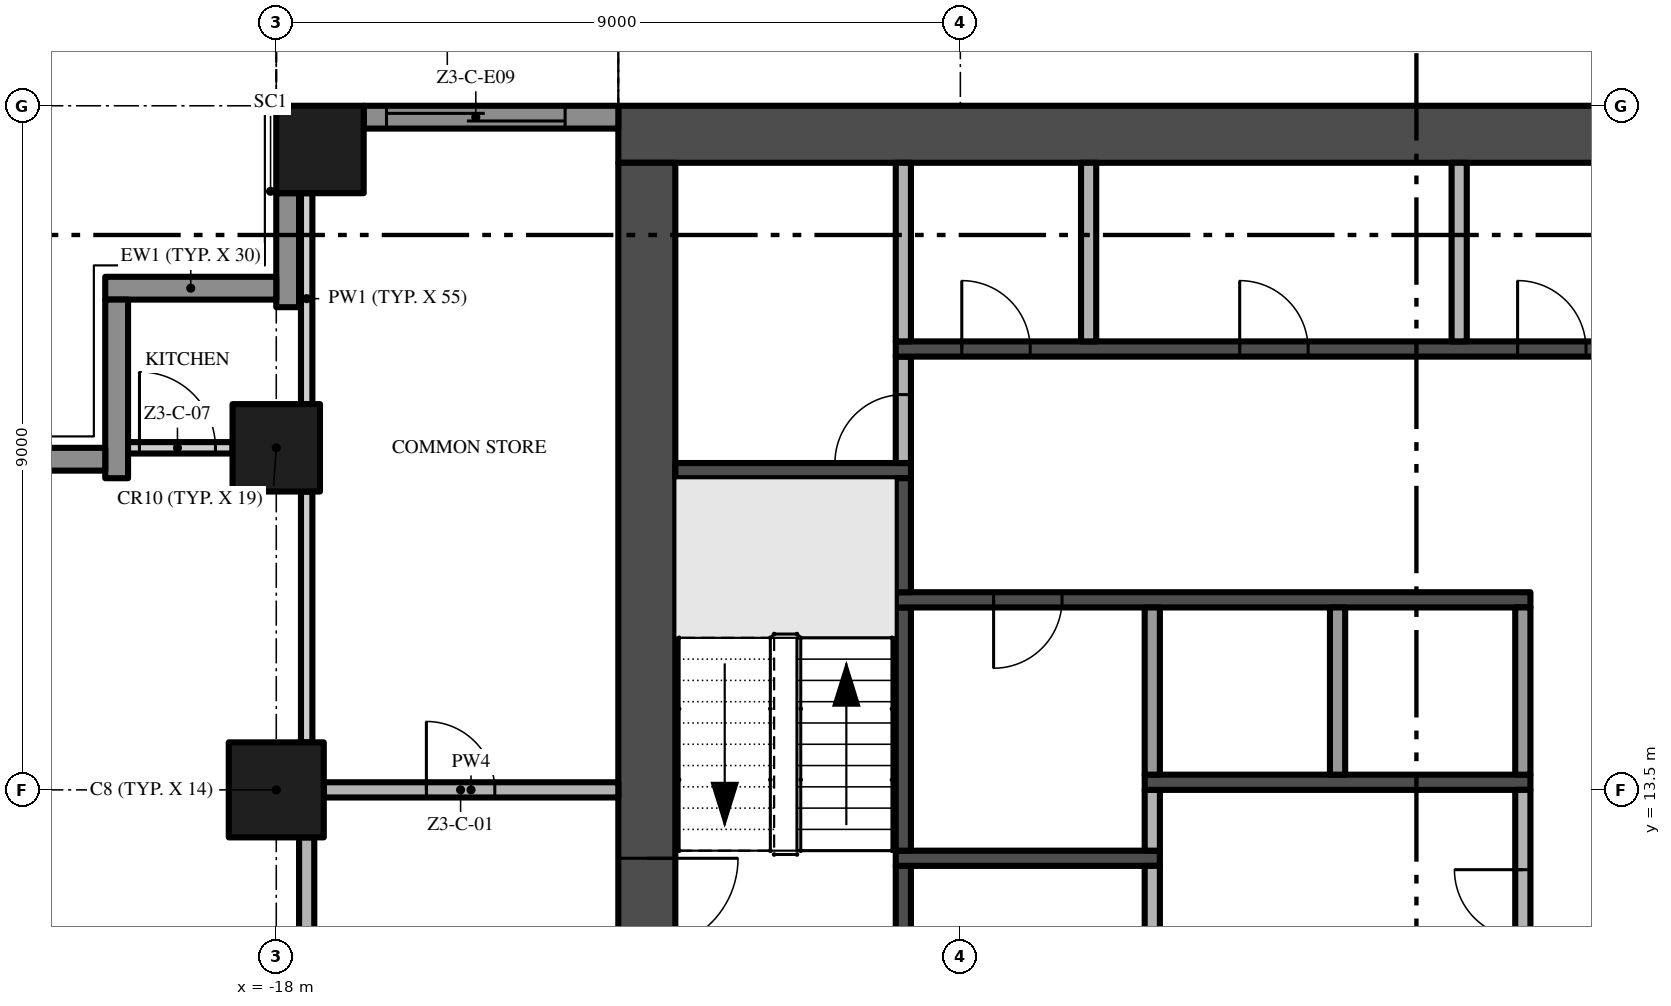
"""IFC4 building model, lengths in metres.
Left out: names, types, materials, properties, quantities, classifications, styles, units other than length and angle.
Written with IfcOpenShell. Run it as: python <this file> out.ifc"""

import sys

from ifc_helpers import new_model, si_unit, direction, frame, frame_2d, origin, origin_2d, place, context, subcontext, project, spatial, rectangle, extrude, element, fill, save


model = new_model("IFC4")
c1 = context("Model", 3, precision=1e-05, world=origin(), true_north=direction((0.0, 1.0)))
c2 = subcontext(c1, "Body", "Model", "MODEL_VIEW")
j1 = project(units=[si_unit("LENGTHUNIT", "METRE"), si_unit("PLANEANGLEUNIT", "RADIAN")], contexts=[c1])
p1 = place(None, origin())
s1 = spatial("IfcSite", under=j1, at=p1, CompositionType="ELEMENT")
p2 = place(p1, origin())
s2 = spatial("IfcBuilding", under=s1, at=p2, CompositionType="ELEMENT")
p3 = place(p2, frame((0.0, 0.0, 151.6)))
s3 = spatial("IfcBuildingStorey", under=s2, at=p3, CompositionType="ELEMENT", Elevation=151.6)
p4 = place(p3, frame((13.5, 22.125, -0.3), z_axis=(0.0, 0.0, 1.0), x_axis=(-1.0, 0.0, 0.0)))
e1 = element("IfcWall", 1, at=p4, inside=s3, PredefinedType="SHEAR", context=c2, shape_type="SweptSolid", body=[
    extrude(rectangle(XDim=27.0, YDim=0.75, at=frame_2d((13.5, 0.0))), origin(), (0.0, 0.0, 1.0), 3.8),
])
p5 = place(p3, frame((-13.125, 21.75, -0.3), z_axis=(0.0, 0.0, 1.0), x_axis=(0.0, -1.0, 0.0)))
e2 = element("IfcWall", 2, at=p5, inside=s3, PredefinedType="SHEAR", context=c2, shape_type="SweptSolid", body=[
    extrude(rectangle(XDim=16.5, YDim=0.75, at=frame_2d((8.25, 0.0))), origin(), (0.0, 0.0, 1.0), 3.8),
])
p6 = place(p5, frame((9.15, 0.0, 0.3)))
e3 = element("IfcOpeningElement", 3, at=p6, cuts=e2, PredefinedType="OPENING", context=c2, shape_type="SweptSolid", body=[
    extrude(rectangle(XDim=1.2, YDim=2.2, at=frame_2d((0.6, 1.1))), frame((0.0, 0.385, 0.0), z_axis=(0.0, -1.0, 0.0), x_axis=(1.0, 0.0, 0.0)), (0.0, 0.0, 1.0), 0.77),
])
p7 = place(p3, frame((-18.0, 13.5, 0.0), z_axis=(0.0, 0.0, 1.0), x_axis=(1.0, 0.0, 0.0)))
e4 = element("IfcColumn", 4, at=p7, inside=s3, PredefinedType="COLUMN", context=c2, shape_type="SweptSolid", body=[
    extrude(rectangle(XDim=1.25, YDim=1.25, at=origin_2d()), origin(), (0.0, 0.0, 1.0), 3.5),
])
for number, where, z_axis, x_axis in (
    (5, (-17.425, 21.925, 0.0), (0.0, 0.0, 1.0), (1.0, 0.0, 0.0)),
    (6, (-18.0, 18.0, 0.0), (0.0, 0.0, 1.0), (1.0, 0.0, 0.0)),
):
    element("IfcColumn", number, at=place(p3, frame(where, z_axis=z_axis, x_axis=x_axis)), inside=s3, PredefinedType="COLUMN", context=c2, shape_type="SweptSolid", body=[
        extrude(rectangle(XDim=1.15, YDim=1.15, at=origin_2d()), origin(), (0.0, 0.0, 1.0), 3.5),
    ])
p8 = place(p3, frame((-16.85, 22.35, 0.0), z_axis=(0.0, 0.0, 1.0), x_axis=(1.0, 0.0, 0.0)))
e7 = element("IfcWall", 7, at=p8, inside=s3, PredefinedType="SOLIDWALL", context=c2, shape_type="SweptSolid", body=[
    extrude(rectangle(XDim=3.35, YDim=0.3, at=frame_2d((1.675, 0.0))), origin(), (0.0, 0.0, 1.0), 3.5),
])
p9 = place(p8, frame((0.3, 0.0, 0.0)))
e8 = element("IfcOpeningElement", 8, at=p9, cuts=e7, PredefinedType="OPENING", context=c2, shape_type="SweptSolid", body=[
    extrude(rectangle(XDim=2.35, YDim=2.4, at=frame_2d((1.175, 1.2))), frame((0.0, 0.16, 0.0), z_axis=(0.0, -1.0, 0.0), x_axis=(1.0, 0.0, 0.0)), (0.0, 0.0, 1.0), 0.32),
])
p10 = place(p3, frame((-17.85, 19.85, 0.0), z_axis=(0.0, 0.0, 1.0), x_axis=(0.0, 1.0, 0.0)))
e9 = element("IfcWall", 9, at=p10, inside=s3, PredefinedType="SOLIDWALL", context=c2, shape_type="SweptSolid", body=[
    extrude(rectangle(XDim=1.5, YDim=0.3, at=frame_2d((0.75, 0.0))), origin(), (0.0, 0.0, 1.0), 3.5),
])
p11 = place(p3, frame((-20.25, 20.1, 0.0), z_axis=(0.0, 0.0, 1.0), x_axis=(1.0, 0.0, 0.0)))
e10 = element("IfcWall", 10, at=p11, inside=s3, PredefinedType="SOLIDWALL", context=c2, shape_type="SweptSolid", body=[
    extrude(rectangle(XDim=2.25, YDim=0.3, at=frame_2d((1.125, 0.0))), origin(), (0.0, 0.0, 1.0), 3.5),
])
p12 = place(p3, frame((-20.1, 17.6, 0.0), z_axis=(0.0, 0.0, 1.0), x_axis=(0.0, 1.0, 0.0)))
e11 = element("IfcWall", 11, at=p12, inside=s3, PredefinedType="SOLIDWALL", context=c2, shape_type="SweptSolid", body=[
    extrude(rectangle(XDim=2.35, YDim=0.3, at=frame_2d((1.175, 0.0))), origin(), (0.0, 0.0, 1.0), 3.5),
])
p13 = place(p3, frame((-22.5, 17.85, 0.0), z_axis=(0.0, 0.0, 1.0), x_axis=(1.0, 0.0, 0.0)))
e12 = element("IfcWall", 12, at=p13, inside=s3, PredefinedType="SOLIDWALL", context=c2, shape_type="SweptSolid", body=[
    extrude(rectangle(XDim=2.25, YDim=0.3, at=frame_2d((1.125, 0.0))), origin(), (0.0, 0.0, 1.0), 3.5),
])
p14 = place(p3, frame((-12.75, 17.7, 0.0), z_axis=(0.0, 0.0, 1.0), x_axis=(1.0, 0.0, 0.0)))
e13 = element("IfcWall", 13, at=p14, inside=s3, PredefinedType="SHEAR", context=c2, shape_type="SweptSolid", body=[
    extrude(rectangle(XDim=3.1, YDim=0.2, at=frame_2d((1.55, 0.0))), origin(), (0.0, 0.0, 1.0), 3.5),
])
p15 = place(p3, frame((-9.75, 10.2, 0.0), z_axis=(0.0, 0.0, 1.0), x_axis=(0.0, 1.0, 0.0)))
e14 = element("IfcWall", 14, at=p15, inside=s3, PredefinedType="SHEAR", context=c2, shape_type="SweptSolid", body=[
    extrude(rectangle(XDim=2.3, YDim=0.2, at=frame_2d((1.15, 0.0))), origin(), (0.0, 0.0, 1.0), 3.5),
])
p16 = place(p3, frame((-9.85, 12.6, 0.0), z_axis=(0.0, 0.0, 1.0), x_axis=(1.0, 0.0, 0.0)))
e15 = element("IfcWall", 15, at=p16, inside=s3, PredefinedType="SHEAR", context=c2, shape_type="SweptSolid", body=[
    extrude(rectangle(XDim=3.475, YDim=0.2, at=frame_2d((1.738, 0.0))), origin(), (0.0, 0.0, 1.0), 3.5),
])
p17 = place(p3, frame((-9.75, 12.7, 0.0), z_axis=(0.0, 0.0, 1.0), x_axis=(0.0, 1.0, 0.0)))
e16 = element("IfcWall", 16, at=p17, inside=s3, PredefinedType="SHEAR", context=c2, shape_type="SweptSolid", body=[
    extrude(rectangle(XDim=3.2, YDim=0.2, at=frame_2d((1.6, 0.0))), origin(), (0.0, 0.0, 1.0), 3.5),
])
p18 = place(p3, frame((-1.5, 16.0, 0.0), z_axis=(0.0, 0.0, 1.0), x_axis=(-1.0, 0.0, 0.0)))
e17 = element("IfcWall", 17, at=p18, inside=s3, PredefinedType="SHEAR", context=c2, shape_type="SweptSolid", body=[
    extrude(rectangle(XDim=8.35, YDim=0.2, at=frame_2d((4.175, 0.0))), origin(), (0.0, 0.0, 1.0), 3.5),
])
p19 = place(p18, frame((6.162, 0.0, 0.0)))
e18 = element("IfcOpeningElement", 18, at=p19, cuts=e17, PredefinedType="OPENING", context=c2, shape_type="SweptSolid", body=[
    extrude(rectangle(XDim=0.9, YDim=2.1, at=frame_2d((0.45, 1.05))), frame((0.0, 0.11, 0.0), z_axis=(0.0, -1.0, 0.0), x_axis=(1.0, 0.0, 0.0)), (0.0, 0.0, 1.0), 0.22),
])
p20 = place(p3, frame((-9.75, 16.1, 0.0), z_axis=(0.0, 0.0, 1.0), x_axis=(0.0, 1.0, 0.0)))
e19 = element("IfcWall", 19, at=p20, inside=s3, PredefinedType="SHEAR", context=c2, shape_type="SweptSolid", body=[
    extrude(rectangle(XDim=1.5, YDim=0.2, at=frame_2d((0.75, 0.0))), origin(), (0.0, 0.0, 1.0), 3.5),
])
p21 = place(p3, frame((-9.75, 17.8, 0.0), z_axis=(0.0, 0.0, 1.0), x_axis=(0.0, 1.0, 0.0)))
e20 = element("IfcWall", 20, at=p21, inside=s3, PredefinedType="PARTITIONING", context=c2, shape_type="SweptSolid", body=[
    extrude(rectangle(XDim=1.4, YDim=0.2, at=frame_2d((0.7, 0.0))), origin(), (0.0, 0.0, 1.0), 3.5),
])
p22 = place(p21, origin())
e21 = element("IfcOpeningElement", 21, at=p22, cuts=e20, PredefinedType="OPENING", context=c2, shape_type="SweptSolid", body=[
    extrude(rectangle(XDim=0.9, YDim=2.1, at=frame_2d((0.45, 1.05))), frame((0.0, 0.11, 0.0), z_axis=(0.0, -1.0, 0.0), x_axis=(1.0, 0.0, 0.0)), (0.0, 0.0, 1.0), 0.22),
])
p23 = place(p3, frame((-9.85, 19.3, 0.0), z_axis=(0.0, 0.0, 1.0), x_axis=(1.0, 0.0, 0.0)))
e22 = element("IfcWall", 22, at=p23, inside=s3, PredefinedType="SHEAR", context=c2, shape_type="SweptSolid", body=[
    extrude(rectangle(XDim=19.7, YDim=0.2, at=frame_2d((9.85, 0.0))), origin(), (0.0, 0.0, 1.0), 3.5),
])
p24 = place(p23, frame((10.519, 0.0, 0.0)))
e23 = element("IfcOpeningElement", 23, at=p24, cuts=e22, PredefinedType="OPENING", context=c2, shape_type="SweptSolid", body=[
    extrude(rectangle(XDim=1.1, YDim=2.1, at=frame_2d((0.55, 1.05))), frame((0.0, 0.11, 0.0), z_axis=(0.0, -1.0, 0.0), x_axis=(1.0, 0.0, 0.0)), (0.0, 0.0, 1.0), 0.22),
])
p25 = place(p23, frame((12.956, 0.0, 0.0)))
e24 = element("IfcOpeningElement", 24, at=p25, cuts=e22, PredefinedType="OPENING", context=c2, shape_type="SweptSolid", body=[
    extrude(rectangle(XDim=1.1, YDim=2.1, at=frame_2d((0.55, 1.05))), frame((0.0, 0.11, 0.0), z_axis=(0.0, -1.0, 0.0), x_axis=(1.0, 0.0, 0.0)), (0.0, 0.0, 1.0), 0.22),
])
p26 = place(p23, frame((15.394, 0.0, 0.0)))
e25 = element("IfcOpeningElement", 25, at=p26, cuts=e22, PredefinedType="OPENING", context=c2, shape_type="SweptSolid", body=[
    extrude(rectangle(XDim=1.1, YDim=2.1, at=frame_2d((0.55, 1.05))), frame((0.0, 0.11, 0.0), z_axis=(0.0, -1.0, 0.0), x_axis=(1.0, 0.0, 0.0)), (0.0, 0.0, 1.0), 0.22),
])
p27 = place(p23, frame((17.831, 0.0, 0.0)))
e26 = element("IfcOpeningElement", 26, at=p27, cuts=e22, PredefinedType="OPENING", context=c2, shape_type="SweptSolid", body=[
    extrude(rectangle(XDim=1.1, YDim=2.1, at=frame_2d((0.55, 1.05))), frame((0.0, 0.11, 0.0), z_axis=(0.0, -1.0, 0.0), x_axis=(1.0, 0.0, 0.0)), (0.0, 0.0, 1.0), 0.22),
])
p28 = place(p23, frame((0.869, 0.0, 0.0)))
e27 = element("IfcOpeningElement", 27, at=p28, cuts=e22, PredefinedType="OPENING", context=c2, shape_type="SweptSolid", body=[
    extrude(rectangle(XDim=0.9, YDim=2.1, at=frame_2d((0.45, 1.05))), frame((0.0, 0.11, 0.0), z_axis=(0.0, -1.0, 0.0), x_axis=(1.0, 0.0, 0.0)), (0.0, 0.0, 1.0), 0.22),
])
p29 = place(p23, frame((4.525, 0.0, 0.0)))
e28 = element("IfcOpeningElement", 28, at=p29, cuts=e22, PredefinedType="OPENING", context=c2, shape_type="SweptSolid", body=[
    extrude(rectangle(XDim=0.9, YDim=2.1, at=frame_2d((0.45, 1.05))), frame((0.0, 0.11, 0.0), z_axis=(0.0, -1.0, 0.0), x_axis=(1.0, 0.0, 0.0)), (0.0, 0.0, 1.0), 0.22),
])
p30 = place(p23, frame((8.181, 0.0, 0.0)))
e29 = element("IfcOpeningElement", 29, at=p30, cuts=e22, PredefinedType="OPENING", context=c2, shape_type="SweptSolid", body=[
    extrude(rectangle(XDim=0.9, YDim=2.1, at=frame_2d((0.45, 1.05))), frame((0.0, 0.11, 0.0), z_axis=(0.0, -1.0, 0.0), x_axis=(1.0, 0.0, 0.0)), (0.0, 0.0, 1.0), 0.22),
])
for number, where, z_axis, x_axis in (
    (30, (-9.75, 19.4, 0.0), (0.0, 0.0, 1.0), (0.0, 1.0, 0.0)),
    (31, (-7.312, 19.4, 0.0), (0.0, 0.0, 1.0), (0.0, 1.0, 0.0)),
):
    element("IfcWall", number, at=place(p3, frame(where, z_axis=z_axis, x_axis=x_axis)), inside=s3, PredefinedType="PARTITIONING", context=c2, shape_type="SweptSolid", body=[
        extrude(rectangle(XDim=2.35, YDim=0.2, at=frame_2d((1.175, 0.0))), origin(), (0.0, 0.0, 1.0), 3.5),
    ])
p31 = place(p3, frame((-6.475, 10.5, 0.0), z_axis=(0.0, 0.0, 1.0), x_axis=(0.0, 1.0, 0.0)))
e32 = element("IfcWall", 32, at=p31, inside=s3, PredefinedType="PARTITIONING", context=c2, shape_type="SweptSolid", body=[
    extrude(rectangle(XDim=2.0, YDim=0.2, at=frame_2d((1.0, 0.0))), origin(), (0.0, 0.0, 1.0), 3.5),
])
p32 = place(p3, frame((-6.475, 12.7, 0.0), z_axis=(0.0, 0.0, 1.0), x_axis=(0.0, 1.0, 0.0)))
e33 = element("IfcWall", 33, at=p32, inside=s3, PredefinedType="PARTITIONING", context=c2, shape_type="SweptSolid", body=[
    extrude(rectangle(XDim=0.8, YDim=0.2, at=frame_2d((0.4, 0.0))), origin(), (0.0, 0.0, 1.0), 3.5),
])
p33 = place(p3, frame((-6.575, 13.6, 0.0), z_axis=(0.0, 0.0, 1.0), x_axis=(1.0, 0.0, 0.0)))
e34 = element("IfcWall", 34, at=p33, inside=s3, PredefinedType="SHEAR", context=c2, shape_type="SweptSolid", body=[
    extrude(rectangle(XDim=5.075, YDim=0.2, at=frame_2d((2.538, 0.0))), origin(), (0.0, 0.0, 1.0), 3.5),
])
for number, where, z_axis, x_axis in (
    (35, (-6.475, 13.7, 0.0), (0.0, 0.0, 1.0), (0.0, 1.0, 0.0)),
    (36, (-4.037, 13.7, 0.0), (0.0, 0.0, 1.0), (0.0, 1.0, 0.0)),
):
    element("IfcWall", number, at=place(p3, frame(where, z_axis=z_axis, x_axis=x_axis)), inside=s3, PredefinedType="PARTITIONING", context=c2, shape_type="SweptSolid", body=[
        extrude(rectangle(XDim=2.2, YDim=0.2, at=frame_2d((1.1, 0.0))), origin(), (0.0, 0.0, 1.0), 3.5),
    ])
p34 = place(p3, frame((-2.438, 19.4, 0.0), z_axis=(0.0, 0.0, 1.0), x_axis=(0.0, 1.0, 0.0)))
e37 = element("IfcWall", 37, at=p34, inside=s3, PredefinedType="PARTITIONING", context=c2, shape_type="SweptSolid", body=[
    extrude(rectangle(XDim=2.35, YDim=0.2, at=frame_2d((1.175, 0.0))), origin(), (0.0, 0.0, 1.0), 3.5),
])
p35 = place(p3, frame((-1.6, 10.5, 0.0), z_axis=(0.0, 0.0, 1.0), x_axis=(0.0, 1.0, 0.0)))
e38 = element("IfcWall", 38, at=p35, inside=s3, PredefinedType="PARTITIONING", context=c2, shape_type="SweptSolid", body=[
    extrude(rectangle(XDim=3.0, YDim=0.2, at=frame_2d((1.5, 0.0))), origin(), (0.0, 0.0, 1.0), 3.5),
])
p36 = place(p35, frame((1.05, 0.0, 0.0)))
e39 = element("IfcOpeningElement", 39, at=p36, cuts=e38, PredefinedType="OPENING", context=c2, shape_type="SweptSolid", body=[
    extrude(rectangle(XDim=0.9, YDim=2.1, at=frame_2d((0.45, 1.05))), frame((0.0, 0.11, 0.0), z_axis=(0.0, -1.0, 0.0), x_axis=(1.0, 0.0, 0.0)), (0.0, 0.0, 1.0), 0.22),
])
p37 = place(p3, frame((-1.6, 13.7, 0.0), z_axis=(0.0, 0.0, 1.0), x_axis=(0.0, 1.0, 0.0)))
e40 = element("IfcWall", 40, at=p37, inside=s3, PredefinedType="PARTITIONING", context=c2, shape_type="SweptSolid", body=[
    extrude(rectangle(XDim=2.2, YDim=0.2, at=frame_2d((1.1, 0.0))), origin(), (0.0, 0.0, 1.0), 3.5),
])
p38 = place(p3, frame((-17.375, 13.5, 0.0), z_axis=(0.0, 0.0, 1.0), x_axis=(1.0, 0.0, 0.0)))
e41 = element("IfcWall", 41, at=p38, inside=s3, PredefinedType="PARTITIONING", context=c2, shape_type="SweptSolid", body=[
    extrude(rectangle(XDim=3.875, YDim=0.2, at=frame_2d((1.938, 0.0))), origin(), (0.0, 0.0, 1.0), 3.5),
])
p39 = place(p38, frame((1.35, 0.0, 0.0)))
e42 = element("IfcOpeningElement", 42, at=p39, cuts=e41, PredefinedType="OPENING", context=c2, shape_type="SweptSolid", body=[
    extrude(rectangle(XDim=0.9, YDim=2.1, at=frame_2d((0.45, 1.05))), frame((0.0, 0.11, 0.0), z_axis=(0.0, -1.0, 0.0), x_axis=(1.0, 0.0, 0.0)), (0.0, 0.0, 1.0), 0.22),
])
p40 = place(p3, frame((-19.95, 18.0, 0.0), z_axis=(0.0, 0.0, 1.0), x_axis=(1.0, 0.0, 0.0)))
e43 = element("IfcWall", 43, at=p40, inside=s3, PredefinedType="PARTITIONING", context=c2, shape_type="SweptSolid", body=[
    extrude(rectangle(XDim=1.375, YDim=0.15, at=frame_2d((0.688, 0.0))), origin(), (0.0, 0.0, 1.0), 3.5),
])
p41 = place(p40, frame((0.15, 0.0, 0.0)))
e44 = element("IfcOpeningElement", 44, at=p41, cuts=e43, PredefinedType="OPENING", context=c2, shape_type="SweptSolid", body=[
    extrude(rectangle(XDim=1.0, YDim=2.4, at=frame_2d((0.5, 1.2))), frame((0.0, 0.085, 0.0), z_axis=(0.0, -1.0, 0.0), x_axis=(1.0, 0.0, 0.0)), (0.0, 0.0, 1.0), 0.17),
])
p42 = place(p3, frame((-17.6, 5.125, 0.0), z_axis=(0.0, 0.0, 1.0), x_axis=(0.0, 1.0, 0.0)))
e45 = element("IfcWall", 45, at=p42, inside=s3, PredefinedType="PARTITIONING", context=c2, shape_type="SweptSolid", body=[
    extrude(rectangle(XDim=7.75, YDim=0.2, at=frame_2d((3.875, 0.0))), origin(), (0.0, 0.0, 1.0), 3.5),
])
p43 = place(p42, frame((1.0, 0.0, 0.0)))
e46 = element("IfcOpeningElement", 46, at=p43, cuts=e45, PredefinedType="OPENING", context=c2, shape_type="SweptSolid", body=[
    extrude(rectangle(XDim=1.2, YDim=2.4, at=frame_2d((0.6, 1.2))), frame((0.0, 0.11, 0.0), z_axis=(0.0, -1.0, 0.0), x_axis=(1.0, 0.0, 0.0)), (0.0, 0.0, 1.0), 0.22),
])
p44 = place(p3, frame((-17.6, 14.125, 0.0), z_axis=(0.0, 0.0, 1.0), x_axis=(0.0, 1.0, 0.0)))
e47 = element("IfcWall", 47, at=p44, inside=s3, PredefinedType="PARTITIONING", context=c2, shape_type="SweptSolid", body=[
    extrude(rectangle(XDim=3.3, YDim=0.15, at=frame_2d((1.65, 0.0))), origin(), (0.0, 0.0, 1.0), 3.5),
])
p45 = place(p3, frame((-17.6, 18.575, 0.0), z_axis=(0.0, 0.0, 1.0), x_axis=(0.0, 1.0, 0.0)))
e48 = element("IfcWall", 48, at=p45, inside=s3, PredefinedType="PARTITIONING", context=c2, shape_type="SweptSolid", body=[
    extrude(rectangle(XDim=2.775, YDim=0.15, at=frame_2d((1.387, 0.0))), origin(), (0.0, 0.0, 1.0), 3.5),
])
p46 = place(p9, origin())
e49 = element("IfcDoor", 49, at=p46, inside=s3, OperationType="SINGLE_SWING_LEFT", PredefinedType="DOOR", context=c2, shape_type="SweptSolid", body=[
    extrude(rectangle(XDim=2.35, YDim=2.4, at=frame_2d((1.175, 1.2))), frame((0.0, 0.025, 0.0), z_axis=(0.0, -1.0, 0.0), x_axis=(1.0, 0.0, 0.0)), (0.0, 0.0, 1.0), 0.05),
])
fill(e8, e49)
p47 = place(p6, frame((1.2, 0.0, 0.0), z_axis=(0.0, 0.0, 1.0), x_axis=(-1.0, 0.0, 0.0)))
e50 = element("IfcDoor", 50, at=p47, inside=s3, OperationType="SINGLE_SWING_RIGHT", PredefinedType="DOOR", context=c2, shape_type="SweptSolid", body=[
    extrude(rectangle(XDim=1.2, YDim=2.2, at=frame_2d((0.6, 1.1))), frame((0.0, 0.025, 0.0), z_axis=(0.0, -1.0, 0.0), x_axis=(1.0, 0.0, 0.0)), (0.0, 0.0, 1.0), 0.05),
])
fill(e3, e50)
p48 = place(p19, origin())
e51 = element("IfcDoor", 51, at=p48, inside=s3, OperationType="SINGLE_SWING_RIGHT", PredefinedType="DOOR", context=c2, shape_type="SweptSolid", body=[
    extrude(rectangle(XDim=0.9, YDim=2.1, at=frame_2d((0.45, 1.05))), frame((0.0, 0.025, 0.0), z_axis=(0.0, -1.0, 0.0), x_axis=(1.0, 0.0, 0.0)), (0.0, 0.0, 1.0), 0.05),
])
fill(e18, e51)
p49 = place(p36, origin())
e52 = element("IfcDoor", 52, at=p49, inside=s3, OperationType="SINGLE_SWING_RIGHT", PredefinedType="DOOR", context=c2, shape_type="SweptSolid", body=[
    extrude(rectangle(XDim=0.9, YDim=2.1, at=frame_2d((0.45, 1.05))), frame((0.0, 0.025, 0.0), z_axis=(0.0, -1.0, 0.0), x_axis=(1.0, 0.0, 0.0)), (0.0, 0.0, 1.0), 0.05),
])
fill(e39, e52)
p50 = place(p22, origin())
e53 = element("IfcDoor", 53, at=p50, inside=s3, OperationType="SINGLE_SWING_LEFT", PredefinedType="DOOR", context=c2, shape_type="SweptSolid", body=[
    extrude(rectangle(XDim=0.9, YDim=2.1, at=frame_2d((0.45, 1.05))), frame((0.0, 0.025, 0.0), z_axis=(0.0, -1.0, 0.0), x_axis=(1.0, 0.0, 0.0)), (0.0, 0.0, 1.0), 0.05),
])
fill(e21, e53)
p51 = place(p28, origin())
e54 = element("IfcDoor", 54, at=p51, inside=s3, OperationType="SINGLE_SWING_LEFT", PredefinedType="DOOR", context=c2, shape_type="SweptSolid", body=[
    extrude(rectangle(XDim=0.9, YDim=2.1, at=frame_2d((0.45, 1.05))), frame((0.0, 0.025, 0.0), z_axis=(0.0, -1.0, 0.0), x_axis=(1.0, 0.0, 0.0)), (0.0, 0.0, 1.0), 0.05),
])
fill(e27, e54)
p52 = place(p29, origin())
e55 = element("IfcDoor", 55, at=p52, inside=s3, OperationType="SINGLE_SWING_LEFT", PredefinedType="DOOR", context=c2, shape_type="SweptSolid", body=[
    extrude(rectangle(XDim=0.9, YDim=2.1, at=frame_2d((0.45, 1.05))), frame((0.0, 0.025, 0.0), z_axis=(0.0, -1.0, 0.0), x_axis=(1.0, 0.0, 0.0)), (0.0, 0.0, 1.0), 0.05),
])
fill(e28, e55)
p53 = place(p30, origin())
e56 = element("IfcDoor", 56, at=p53, inside=s3, OperationType="SINGLE_SWING_LEFT", PredefinedType="DOOR", context=c2, shape_type="SweptSolid", body=[
    extrude(rectangle(XDim=0.9, YDim=2.1, at=frame_2d((0.45, 1.05))), frame((0.0, 0.025, 0.0), z_axis=(0.0, -1.0, 0.0), x_axis=(1.0, 0.0, 0.0)), (0.0, 0.0, 1.0), 0.05),
])
fill(e29, e56)
p54 = place(p39, origin())
e57 = element("IfcDoor", 57, at=p54, inside=s3, OperationType="SINGLE_SWING_LEFT", PredefinedType="DOOR", context=c2, shape_type="SweptSolid", body=[
    extrude(rectangle(XDim=0.9, YDim=2.1, at=frame_2d((0.45, 1.05))), frame((0.0, 0.025, 0.0), z_axis=(0.0, -1.0, 0.0), x_axis=(1.0, 0.0, 0.0)), (0.0, 0.0, 1.0), 0.05),
])
fill(e42, e57)
p55 = place(p41, origin())
e58 = element("IfcDoor", 58, at=p55, inside=s3, OperationType="SINGLE_SWING_LEFT", PredefinedType="DOOR", context=c2, shape_type="SweptSolid", body=[
    extrude(rectangle(XDim=1.0, YDim=2.4, at=frame_2d((0.5, 1.2))), frame((0.0, 0.025, 0.0), z_axis=(0.0, -1.0, 0.0), x_axis=(1.0, 0.0, 0.0)), (0.0, 0.0, 1.0), 0.05),
])
fill(e44, e58)
save(model, sys.argv[1])
